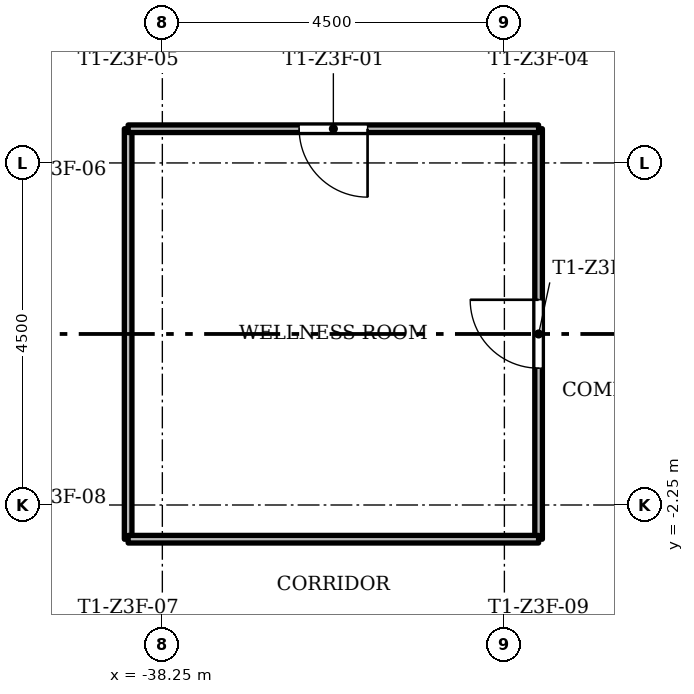
"""IFC4 building model, lengths in metres.
Left out: names, types, materials, properties, quantities, classifications, styles, units other than length and angle.
Written with IfcOpenShell. Run it as: python <this file> out.ifc"""

import sys

from ifc_helpers import new_model, si_unit, direction, frame, frame_2d, origin, place, context, subcontext, project, spatial, rectangle, extrude, element, fill, save


model = new_model("IFC4")
c1 = context("Model", 3, precision=1e-05, world=origin(), true_north=direction((0.0, 1.0)))
c2 = subcontext(c1, "Body", "Model", "MODEL_VIEW")
j1 = project(units=[si_unit("LENGTHUNIT", "METRE"), si_unit("PLANEANGLEUNIT", "RADIAN")], contexts=[c1])
p1 = place(None, origin())
s1 = spatial("IfcSite", under=j1, at=p1, CompositionType="ELEMENT")
p2 = place(p1, origin())
s2 = spatial("IfcBuilding", under=s1, at=p2, CompositionType="ELEMENT")
p3 = place(p2, frame((0.0, 0.0, 167.7)))
s3 = spatial("IfcBuildingStorey", under=s2, at=p3, CompositionType="ELEMENT", Elevation=167.7)
p4 = place(p3, frame((-38.7, -2.7, 0.0), z_axis=(0.0, 0.0, 1.0), x_axis=(0.0, 1.0, 0.0)))
e1 = element("IfcWall", 1, at=p4, inside=s3, PredefinedType="PARTITIONING", context=c2, shape_type="SweptSolid", body=[
    extrude(rectangle(XDim=5.4, YDim=0.1, at=frame_2d((2.7, 0.0))), origin(), (0.0, 0.0, 1.0), 3.0),
])
p5 = place(p3, frame((-33.3, -2.7, 0.0), z_axis=(0.0, 0.0, 1.0), x_axis=(0.0, 1.0, 0.0)))
e2 = element("IfcWall", 2, at=p5, inside=s3, PredefinedType="PARTITIONING", context=c2, shape_type="SweptSolid", body=[
    extrude(rectangle(XDim=5.4, YDim=0.1, at=frame_2d((2.7, 0.0))), origin(), (0.0, 0.0, 1.0), 3.0),
])
p6 = place(p5, frame((2.25, 0.0, 0.0)))
e3 = element("IfcOpeningElement", 3, at=p6, cuts=e2, PredefinedType="OPENING", context=c2, shape_type="SweptSolid", body=[
    extrude(rectangle(XDim=0.9, YDim=2.1, at=frame_2d((0.45, 1.05))), frame((0.0, 0.06, 0.0), z_axis=(0.0, -1.0, 0.0), x_axis=(1.0, 0.0, 0.0)), (0.0, 0.0, 1.0), 0.12),
])
p7 = place(p3, frame((-38.7, -2.7, 0.0), z_axis=(0.0, 0.0, 1.0), x_axis=(1.0, 0.0, 0.0)))
e4 = element("IfcWall", 4, at=p7, inside=s3, PredefinedType="PARTITIONING", context=c2, shape_type="SweptSolid", body=[
    extrude(rectangle(XDim=5.4, YDim=0.1, at=frame_2d((2.7, 0.0))), origin(), (0.0, 0.0, 1.0), 3.0),
])
p8 = place(p3, frame((-38.7, 2.7, 0.0), z_axis=(0.0, 0.0, 1.0), x_axis=(1.0, 0.0, 0.0)))
e5 = element("IfcWall", 5, at=p8, inside=s3, PredefinedType="PARTITIONING", context=c2, shape_type="SweptSolid", body=[
    extrude(rectangle(XDim=5.4, YDim=0.1, at=frame_2d((2.7, 0.0))), origin(), (0.0, 0.0, 1.0), 3.0),
])
p9 = place(p8, frame((2.25, 0.0, 0.0)))
e6 = element("IfcOpeningElement", 6, at=p9, cuts=e5, PredefinedType="OPENING", context=c2, shape_type="SweptSolid", body=[
    extrude(rectangle(XDim=0.9, YDim=2.1, at=frame_2d((0.45, 1.05))), frame((0.0, 0.06, 0.0), z_axis=(0.0, -1.0, 0.0), x_axis=(1.0, 0.0, 0.0)), (0.0, 0.0, 1.0), 0.12),
])
p10 = place(p9, origin())
e7 = element("IfcDoor", 7, at=p10, inside=s3, OperationType="SINGLE_SWING_RIGHT", PredefinedType="DOOR", context=c2, shape_type="SweptSolid", body=[
    extrude(rectangle(XDim=0.9, YDim=2.1, at=frame_2d((0.45, 1.05))), frame((0.0, 0.025, 0.0), z_axis=(0.0, -1.0, 0.0), x_axis=(1.0, 0.0, 0.0)), (0.0, 0.0, 1.0), 0.05),
])
fill(e6, e7)
p11 = place(p6, origin())
e8 = element("IfcDoor", 8, at=p11, inside=s3, OperationType="SINGLE_SWING_LEFT", PredefinedType="DOOR", context=c2, shape_type="SweptSolid", body=[
    extrude(rectangle(XDim=0.9, YDim=2.1, at=frame_2d((0.45, 1.05))), frame((0.0, 0.025, 0.0), z_axis=(0.0, -1.0, 0.0), x_axis=(1.0, 0.0, 0.0)), (0.0, 0.0, 1.0), 0.05),
])
fill(e3, e8)
save(model, sys.argv[1])
